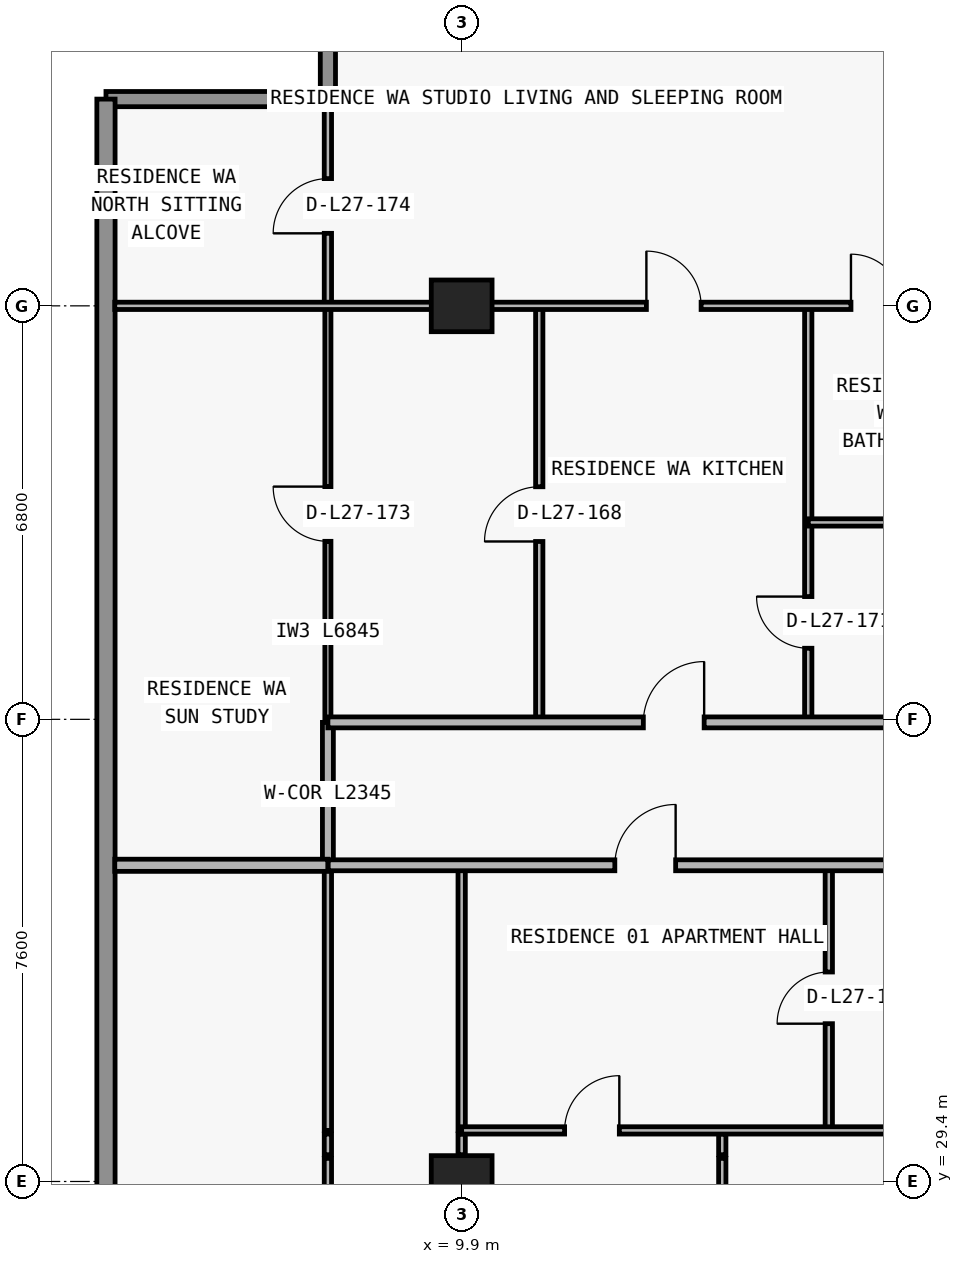
"""IFC4 building model, lengths in metres.
Left out: names, types, materials, properties, quantities, classifications, styles, units other than length and angle.
Written with IfcOpenShell. Run it as: python <this file> out.ifc"""

import sys

from ifc_helpers import new_model, si_unit, direction, frame, frame_2d, origin, origin_2d, place, context, subcontext, project, spatial, rectangle, extrude, element, fill, save


model = new_model("IFC4")
c1 = context("Model", 3, precision=1e-05, world=origin(), true_north=direction((0.0, 1.0)))
c2 = subcontext(c1, "Body", "Model", "MODEL_VIEW")
j1 = project(units=[si_unit("LENGTHUNIT", "METRE"), si_unit("PLANEANGLEUNIT", "RADIAN")], contexts=[c1])
p1 = place(None, origin())
s1 = spatial("IfcSite", under=j1, at=p1, CompositionType="ELEMENT")
p2 = place(p1, origin())
s2 = spatial("IfcBuilding", under=s1, at=p2, CompositionType="ELEMENT")
p3 = place(p2, frame((0.0, 0.0, 102.6)))
s3 = spatial("IfcBuildingStorey", under=s2, at=p3, CompositionType="ELEMENT", Elevation=102.6)
for number, where, z_axis, x_axis in (
    (1, (9.9, 29.4, 0.0), (0.0, 0.0, 1.0), (1.0, 0.0, 0.0)),
    (2, (9.9, 43.8, 0.0), (0.0, 0.0, 1.0), (1.0, 0.0, 0.0)),
):
    element("IfcColumn", number, at=place(p3, frame(where, z_axis=z_axis, x_axis=x_axis)), inside=s3, PredefinedType="COLUMN", context=c2, shape_type="SweptSolid", body=[
        extrude(rectangle(XDim=1.0, YDim=0.85, at=origin_2d()), origin(), (0.0, 0.0, 1.0), 3.05),
    ])
p4 = place(p3, frame((4.05, 47.2, 0.0), z_axis=(0.0, 0.0, 1.0), x_axis=(1.0, 0.0, 0.0)))
e3 = element("IfcWall", 3, at=p4, inside=s3, PredefinedType="ELEMENTEDWALL", context=c2, shape_type="SweptSolid", body=[
    extrude(rectangle(XDim=3.65, YDim=0.25, at=frame_2d((1.825, 0.0))), origin(), (0.0, 0.0, 1.0), 3.05),
])
p5 = place(p3, frame((7.7, 47.2, 0.0), z_axis=(0.0, 0.0, 1.0), x_axis=(0.0, 1.0, 0.0)))
e4 = element("IfcWall", 4, at=p5, inside=s3, PredefinedType="ELEMENTEDWALL", context=c2, shape_type="SweptSolid", body=[
    extrude(rectangle(XDim=3.25, YDim=0.25, at=frame_2d((1.625, 0.0))), origin(), (0.0, 0.0, 1.0), 3.05),
])
p6 = place(p3, frame((4.05, 28.0, 0.0), z_axis=(0.0, 0.0, 1.0), x_axis=(0.0, 1.0, 0.0)))
e5 = element("IfcWall", 5, at=p6, inside=s3, PredefinedType="STANDARD", context=c2, shape_type="SweptSolid", body=[
    extrude(rectangle(XDim=19.2, YDim=0.3, at=frame_2d((9.6, 0.0))), origin(), (0.0, 0.0, 1.0), 3.05),
])
p7 = place(p3, frame((7.7, 25.09, 0.0), z_axis=(0.0, 0.0, 1.0), x_axis=(0.0, 1.0, 0.0)))
e6 = element("IfcWall", 6, at=p7, inside=s3, PredefinedType="PARTITIONING", context=c2, shape_type="SweptSolid", body=[
    extrude(rectangle(XDim=4.69, YDim=0.12, at=frame_2d((2.345, 0.0))), origin(), (0.0, 0.0, 1.0), 3.05),
])
p8 = place(p3, frame((7.7, 29.84, 0.0), z_axis=(0.0, 0.0, 1.0), x_axis=(0.0, 1.0, 0.0)))
e7 = element("IfcWall", 7, at=p8, inside=s3, PredefinedType="PARTITIONING", context=c2, shape_type="SweptSolid", body=[
    extrude(rectangle(XDim=0.34, YDim=0.12, at=frame_2d((0.17, 0.0))), origin(), (0.0, 0.0, 1.0), 3.05),
])
p9 = place(p3, frame((7.7, 30.24, 0.0), z_axis=(0.0, 0.0, 1.0), x_axis=(0.0, 1.0, 0.0)))
e8 = element("IfcWall", 8, at=p9, inside=s3, PredefinedType="PARTITIONING", context=c2, shape_type="SweptSolid", body=[
    extrude(rectangle(XDim=4.36, YDim=0.12, at=frame_2d((2.18, 0.0))), origin(), (0.0, 0.0, 1.0), 3.05),
])
p10 = place(p3, frame((7.7, 34.605, 0.0), z_axis=(0.0, 0.0, 1.0), x_axis=(0.0, 1.0, 0.0)))
e9 = element("IfcWall", 9, at=p10, inside=s3, PredefinedType="PARTITIONING", context=c2, shape_type="SweptSolid", body=[
    extrude(rectangle(XDim=2.345, YDim=0.18, at=frame_2d((1.172, 0.0))), origin(), (0.0, 0.0, 1.0), 3.05),
])
p11 = place(p3, frame((7.7, 36.955, 0.0), z_axis=(0.0, 0.0, 1.0), x_axis=(0.0, 1.0, 0.0)))
e10 = element("IfcWall", 10, at=p11, inside=s3, PredefinedType="MOVABLE", context=c2, shape_type="SweptSolid", body=[
    extrude(rectangle(XDim=6.845, YDim=0.1, at=frame_2d((3.422, 0.0))), origin(), (0.0, 0.0, 1.0), 3.05),
])
p12 = place(p11, frame((2.972, 0.0, 0.0)))
e11 = element("IfcOpeningElement", 11, at=p12, cuts=e10, PredefinedType="OPENING", context=c2, shape_type="SweptSolid", body=[
    extrude(rectangle(XDim=0.9, YDim=2.15, at=frame_2d((0.45, 1.075))), frame((0.0, 0.06, 0.0), z_axis=(0.0, -1.0, 0.0), x_axis=(1.0, 0.0, 0.0)), (0.0, 0.0, 1.0), 0.12),
])
p13 = place(p3, frame((7.7, 43.805, 0.0), z_axis=(0.0, 0.0, 1.0), x_axis=(0.0, 1.0, 0.0)))
e12 = element("IfcWall", 12, at=p13, inside=s3, PredefinedType="PARTITIONING", context=c2, shape_type="SweptSolid", body=[
    extrude(rectangle(XDim=3.275, YDim=0.12, at=frame_2d((1.638, 0.0))), origin(), (0.0, 0.0, 1.0), 3.05),
])
p14 = place(p13, frame((1.188, 0.0, 0.0)))
e13 = element("IfcOpeningElement", 13, at=p14, cuts=e12, PredefinedType="OPENING", context=c2, shape_type="SweptSolid", body=[
    extrude(rectangle(XDim=0.9, YDim=2.15, at=frame_2d((0.45, 1.075))), frame((0.0, 0.07, 0.0), z_axis=(0.0, -1.0, 0.0), x_axis=(1.0, 0.0, 0.0)), (0.0, 0.0, 1.0), 0.14),
])
p15 = place(p3, frame((9.9, 25.09, 0.0), z_axis=(0.0, 0.0, 1.0), x_axis=(0.0, 1.0, 0.0)))
e14 = element("IfcWall", 14, at=p15, inside=s3, PredefinedType="PARTITIONING", context=c2, shape_type="SweptSolid", body=[
    extrude(rectangle(XDim=4.69, YDim=0.12, at=frame_2d((2.345, 0.0))), origin(), (0.0, 0.0, 1.0), 2.174),
])
p16 = place(p15, frame((1.895, 0.0, 0.0)))
e15 = element("IfcOpeningElement", 15, at=p16, cuts=e14, PredefinedType="OPENING", context=c2, shape_type="SweptSolid", body=[
    extrude(rectangle(XDim=0.9, YDim=2.124, at=frame_2d((0.45, 1.062))), frame((0.0, 0.07, 0.0), z_axis=(0.0, -1.0, 0.0), x_axis=(1.0, 0.0, 0.0)), (0.0, 0.0, 1.0), 0.14),
])
p17 = place(p3, frame((9.9, 29.84, 0.0), z_axis=(0.0, 0.0, 1.0), x_axis=(0.0, 1.0, 0.0)))
e16 = element("IfcWall", 16, at=p17, inside=s3, PredefinedType="PARTITIONING", context=c2, shape_type="SweptSolid", body=[
    extrude(rectangle(XDim=0.34, YDim=0.12, at=frame_2d((0.17, 0.0))), origin(), (0.0, 0.0, 1.0), 2.174),
])
p18 = place(p3, frame((9.9, 30.24, 0.0), z_axis=(0.0, 0.0, 1.0), x_axis=(0.0, 1.0, 0.0)))
e17 = element("IfcWall", 17, at=p18, inside=s3, PredefinedType="PARTITIONING", context=c2, shape_type="SweptSolid", body=[
    extrude(rectangle(XDim=4.36, YDim=0.12, at=frame_2d((2.18, 0.0))), origin(), (0.0, 0.0, 1.0), 2.174),
])
p19 = place(p3, frame((11.176, 36.95, 0.0), z_axis=(0.0, 0.0, 1.0), x_axis=(0.0, 1.0, 0.0)))
e18 = element("IfcWall", 18, at=p19, inside=s3, PredefinedType="PARTITIONING", context=c2, shape_type="SweptSolid", body=[
    extrude(rectangle(XDim=6.85, YDim=0.12, at=frame_2d((3.425, 0.0))), origin(), (0.0, 0.0, 1.0), 3.05),
])
p20 = place(p19, frame((2.975, 0.0, 0.0)))
e19 = element("IfcOpeningElement", 19, at=p20, cuts=e18, PredefinedType="OPENING", context=c2, shape_type="SweptSolid", body=[
    extrude(rectangle(XDim=0.9, YDim=2.15, at=frame_2d((0.45, 1.075))), frame((0.0, 0.07, 0.0), z_axis=(0.0, -1.0, 0.0), x_axis=(1.0, 0.0, 0.0)), (0.0, 0.0, 1.0), 0.14),
])
p21 = place(p3, frame((14.186, 25.09, 0.0), z_axis=(0.0, 0.0, 1.0), x_axis=(0.0, 1.0, 0.0)))
e20 = element("IfcWall", 20, at=p21, inside=s3, PredefinedType="PARTITIONING", context=c2, shape_type="SweptSolid", body=[
    extrude(rectangle(XDim=4.69, YDim=0.12, at=frame_2d((2.345, 0.0))), origin(), (0.0, 0.0, 1.0), 3.05),
])
p22 = place(p21, frame((1.895, 0.0, 0.0)))
e21 = element("IfcOpeningElement", 21, at=p22, cuts=e20, PredefinedType="OPENING", context=c2, shape_type="SweptSolid", body=[
    extrude(rectangle(XDim=0.9, YDim=2.15, at=frame_2d((0.45, 1.075))), frame((0.0, 0.07, 0.0), z_axis=(0.0, -1.0, 0.0), x_axis=(1.0, 0.0, 0.0)), (0.0, 0.0, 1.0), 0.14),
])
p23 = place(p3, frame((14.186, 29.84, 0.0), z_axis=(0.0, 0.0, 1.0), x_axis=(0.0, 1.0, 0.0)))
e22 = element("IfcWall", 22, at=p23, inside=s3, PredefinedType="PARTITIONING", context=c2, shape_type="SweptSolid", body=[
    extrude(rectangle(XDim=0.34, YDim=0.12, at=frame_2d((0.17, 0.0))), origin(), (0.0, 0.0, 1.0), 3.05),
])
p24 = place(p3, frame((15.6, 36.95, 0.0), z_axis=(0.0, 0.0, 1.0), x_axis=(0.0, 1.0, 0.0)))
e23 = element("IfcWall", 23, at=p24, inside=s3, PredefinedType="PARTITIONING", context=c2, shape_type="SweptSolid", body=[
    extrude(rectangle(XDim=6.85, YDim=0.12, at=frame_2d((3.425, 0.0))), origin(), (0.0, 0.0, 1.0), 3.05),
])
p25 = place(p24, frame((1.219, 0.0, 0.0)))
e24 = element("IfcOpeningElement", 24, at=p25, cuts=e23, PredefinedType="OPENING", context=c2, shape_type="SweptSolid", body=[
    extrude(rectangle(XDim=0.85, YDim=2.1, at=frame_2d((0.425, 1.05))), frame((0.0, 0.07, 0.0), z_axis=(0.0, -1.0, 0.0), x_axis=(1.0, 0.0, 0.0)), (0.0, 0.0, 1.0), 0.14),
])
p26 = place(p3, frame((15.938, 30.24, 0.0), z_axis=(0.0, 0.0, 1.0), x_axis=(0.0, 1.0, 0.0)))
e25 = element("IfcWall", 25, at=p26, inside=s3, PredefinedType="PARTITIONING", context=c2, shape_type="SweptSolid", body=[
    extrude(rectangle(XDim=4.36, YDim=0.12, at=frame_2d((2.18, 0.0))), origin(), (0.0, 0.0, 1.0), 3.05),
])
p27 = place(p26, frame((1.755, 0.0, 0.0)))
e26 = element("IfcOpeningElement", 26, at=p27, cuts=e25, PredefinedType="OPENING", context=c2, shape_type="SweptSolid", body=[
    extrude(rectangle(XDim=0.85, YDim=2.1, at=frame_2d((0.425, 1.05))), frame((0.0, 0.07, 0.0), z_axis=(0.0, -1.0, 0.0), x_axis=(1.0, 0.0, 0.0)), (0.0, 0.0, 1.0), 0.14),
])
p28 = place(p3, frame((9.9, 30.24, 0.0), z_axis=(0.0, 0.0, 1.0), x_axis=(1.0, 0.0, 0.0)))
e27 = element("IfcWall", 27, at=p28, inside=s3, PredefinedType="PARTITIONING", context=c2, shape_type="SweptSolid", body=[
    extrude(rectangle(XDim=8.35, YDim=0.12, at=frame_2d((4.175, 0.0))), origin(), (0.0, 0.0, 1.0), 3.05),
])
p29 = place(p28, frame((1.693, 0.0, 0.0)))
e28 = element("IfcOpeningElement", 28, at=p29, cuts=e27, PredefinedType="OPENING", context=c2, shape_type="SweptSolid", body=[
    extrude(rectangle(XDim=0.9, YDim=2.15, at=frame_2d((0.45, 1.075))), frame((0.0, 0.07, 0.0), z_axis=(0.0, -1.0, 0.0), x_axis=(1.0, 0.0, 0.0)), (0.0, 0.0, 1.0), 0.14),
])
p30 = place(p3, frame((4.195, 34.6, 0.0), z_axis=(0.0, 0.0, 1.0), x_axis=(1.0, 0.0, 0.0)))
e29 = element("IfcWall", 29, at=p30, inside=s3, PredefinedType="PARTITIONING", context=c2, shape_type="SweptSolid", body=[
    extrude(rectangle(XDim=3.505, YDim=0.2, at=frame_2d((1.752, 0.0))), origin(), (0.0, 0.0, 1.0), 3.05),
])
p31 = place(p3, frame((7.705, 34.6, 0.0), z_axis=(0.0, 0.0, 1.0), x_axis=(1.0, 0.0, 0.0)))
e30 = element("IfcWall", 30, at=p31, inside=s3, PredefinedType="PARTITIONING", context=c2, shape_type="SweptSolid", body=[
    extrude(rectangle(XDim=10.545, YDim=0.18, at=frame_2d((5.272, 0.0))), origin(), (0.0, 0.0, 1.0), 3.05),
])
p32 = place(p31, frame((4.714, 0.0, 0.0)))
e31 = element("IfcOpeningElement", 31, at=p32, cuts=e30, PredefinedType="OPENING", context=c2, shape_type="SweptSolid", body=[
    extrude(rectangle(XDim=1.0, YDim=2.2, at=frame_2d((0.5, 1.1))), frame((0.0, 0.1, 0.0), z_axis=(0.0, -1.0, 0.0), x_axis=(1.0, 0.0, 0.0)), (0.0, 0.0, 1.0), 0.2),
])
p33 = place(p3, frame((7.7, 36.95, 0.0), z_axis=(0.0, 0.0, 1.0), x_axis=(1.0, 0.0, 0.0)))
e32 = element("IfcWall", 32, at=p33, inside=s3, PredefinedType="PARTITIONING", context=c2, shape_type="SweptSolid", body=[
    extrude(rectangle(XDim=10.145, YDim=0.18, at=frame_2d((5.073, 0.0))), origin(), (0.0, 0.0, 1.0), 3.05),
])
p34 = place(p33, frame((5.188, 0.0, 0.0)))
e33 = element("IfcOpeningElement", 33, at=p34, cuts=e32, PredefinedType="OPENING", context=c2, shape_type="SweptSolid", body=[
    extrude(rectangle(XDim=1.0, YDim=2.2, at=frame_2d((0.5, 1.1))), frame((0.0, 0.1, 0.0), z_axis=(0.0, -1.0, 0.0), x_axis=(1.0, 0.0, 0.0)), (0.0, 0.0, 1.0), 0.2),
])
p35 = place(p3, frame((15.6, 40.238, 0.0), z_axis=(0.0, 0.0, 1.0), x_axis=(1.0, 0.0, 0.0)))
e34 = element("IfcWall", 34, at=p35, inside=s3, PredefinedType="PARTITIONING", context=c2, shape_type="SweptSolid", body=[
    extrude(rectangle(XDim=2.255, YDim=0.12, at=frame_2d((1.127, 0.0))), origin(), (0.0, 0.0, 1.0), 3.05),
])
p36 = place(p3, frame((4.195, 43.8, 0.0), z_axis=(0.0, 0.0, 1.0), x_axis=(1.0, 0.0, 0.0)))
e35 = element("IfcWall", 35, at=p36, inside=s3, PredefinedType="PARTITIONING", context=c2, shape_type="SweptSolid", body=[
    extrude(rectangle(XDim=13.66, YDim=0.12, at=frame_2d((6.83, 0.0))), origin(), (0.0, 0.0, 1.0), 2.339),
])
p37 = place(p36, frame((8.743, 0.0, 0.0)))
e36 = element("IfcOpeningElement", 36, at=p37, cuts=e35, PredefinedType="OPENING", context=c2, shape_type="SweptSolid", body=[
    extrude(rectangle(XDim=0.9, YDim=2.15, at=frame_2d((0.45, 1.075))), frame((0.0, 0.07, 0.0), z_axis=(0.0, -1.0, 0.0), x_axis=(1.0, 0.0, 0.0)), (0.0, 0.0, 1.0), 0.14),
])
p38 = place(p36, frame((12.107, 0.0, 0.0)))
e37 = element("IfcOpeningElement", 37, at=p38, cuts=e35, PredefinedType="OPENING", context=c2, shape_type="SweptSolid", body=[
    extrude(rectangle(XDim=0.85, YDim=2.1, at=frame_2d((0.425, 1.05))), frame((0.0, 0.07, 0.0), z_axis=(0.0, -1.0, 0.0), x_axis=(1.0, 0.0, 0.0)), (0.0, 0.0, 1.0), 0.14),
])
p39 = place(p32, origin())
e38 = element("IfcDoor", 38, at=p39, inside=s3, OperationType="SINGLE_SWING_RIGHT", PredefinedType="DOOR", context=c2, shape_type="SweptSolid", body=[
    extrude(rectangle(XDim=1.0, YDim=2.2, at=frame_2d((0.5, 1.1))), frame((0.0, 0.025, 0.0), z_axis=(0.0, -1.0, 0.0), x_axis=(1.0, 0.0, 0.0)), (0.0, 0.0, 1.0), 0.05),
])
fill(e31, e38)
p40 = place(p27, origin())
e39 = element("IfcDoor", 39, at=p40, inside=s3, OperationType="SINGLE_SWING_LEFT", PredefinedType="DOOR", context=c2, shape_type="SweptSolid", body=[
    extrude(rectangle(XDim=0.85, YDim=2.1, at=frame_2d((0.425, 1.05))), frame((0.0, 0.025, 0.0), z_axis=(0.0, -1.0, 0.0), x_axis=(1.0, 0.0, 0.0)), (0.0, 0.0, 1.0), 0.05),
])
fill(e26, e39)
p41 = place(p29, origin())
e40 = element("IfcDoor", 40, at=p41, inside=s3, OperationType="SINGLE_SWING_RIGHT", PredefinedType="DOOR", context=c2, shape_type="SweptSolid", body=[
    extrude(rectangle(XDim=0.9, YDim=2.15, at=frame_2d((0.45, 1.075))), frame((0.0, 0.025, 0.0), z_axis=(0.0, -1.0, 0.0), x_axis=(1.0, 0.0, 0.0)), (0.0, 0.0, 1.0), 0.05),
])
fill(e28, e40)
p42 = place(p20, origin())
e41 = element("IfcDoor", 41, at=p42, inside=s3, OperationType="SINGLE_SWING_LEFT", PredefinedType="DOOR", context=c2, shape_type="SweptSolid", body=[
    extrude(rectangle(XDim=0.9, YDim=2.15, at=frame_2d((0.45, 1.075))), frame((0.0, 0.025, 0.0), z_axis=(0.0, -1.0, 0.0), x_axis=(1.0, 0.0, 0.0)), (0.0, 0.0, 1.0), 0.05),
])
fill(e19, e41)
p43 = place(p34, origin())
e42 = element("IfcDoor", 42, at=p43, inside=s3, OperationType="SINGLE_SWING_RIGHT", PredefinedType="DOOR", context=c2, shape_type="SweptSolid", body=[
    extrude(rectangle(XDim=1.0, YDim=2.2, at=frame_2d((0.5, 1.1))), frame((0.0, 0.025, 0.0), z_axis=(0.0, -1.0, 0.0), x_axis=(1.0, 0.0, 0.0)), (0.0, 0.0, 1.0), 0.05),
])
fill(e33, e42)
p44 = place(p37, origin())
e43 = element("IfcDoor", 43, at=p44, inside=s3, OperationType="SINGLE_SWING_LEFT", PredefinedType="DOOR", context=c2, shape_type="SweptSolid", body=[
    extrude(rectangle(XDim=0.9, YDim=2.15, at=frame_2d((0.45, 1.075))), frame((0.0, 0.025, 0.0), z_axis=(0.0, -1.0, 0.0), x_axis=(1.0, 0.0, 0.0)), (0.0, 0.0, 1.0), 0.05),
])
fill(e36, e43)
p45 = place(p25, origin())
e44 = element("IfcDoor", 44, at=p45, inside=s3, OperationType="SINGLE_SWING_RIGHT", PredefinedType="DOOR", context=c2, shape_type="SweptSolid", body=[
    extrude(rectangle(XDim=0.85, YDim=2.1, at=frame_2d((0.425, 1.05))), frame((0.0, 0.025, 0.0), z_axis=(0.0, -1.0, 0.0), x_axis=(1.0, 0.0, 0.0)), (0.0, 0.0, 1.0), 0.05),
])
fill(e24, e44)
p46 = place(p38, origin())
e45 = element("IfcDoor", 45, at=p46, inside=s3, OperationType="SINGLE_SWING_LEFT", PredefinedType="DOOR", context=c2, shape_type="SweptSolid", body=[
    extrude(rectangle(XDim=0.85, YDim=2.1, at=frame_2d((0.425, 1.05))), frame((0.0, 0.025, 0.0), z_axis=(0.0, -1.0, 0.0), x_axis=(1.0, 0.0, 0.0)), (0.0, 0.0, 1.0), 0.05),
])
fill(e37, e45)
p47 = place(p12, origin())
e46 = element("IfcDoor", 46, at=p47, inside=s3, OperationType="SINGLE_SWING_RIGHT", PredefinedType="DOOR", context=c2, shape_type="SweptSolid", body=[
    extrude(rectangle(XDim=0.9, YDim=2.15, at=frame_2d((0.45, 1.075))), frame((0.0, 0.025, 0.0), z_axis=(0.0, -1.0, 0.0), x_axis=(1.0, 0.0, 0.0)), (0.0, 0.0, 1.0), 0.05),
])
fill(e11, e46)
p48 = place(p14, origin())
e47 = element("IfcDoor", 47, at=p48, inside=s3, OperationType="SINGLE_SWING_LEFT", PredefinedType="DOOR", context=c2, shape_type="SweptSolid", body=[
    extrude(rectangle(XDim=0.9, YDim=2.15, at=frame_2d((0.45, 1.075))), frame((0.0, 0.025, 0.0), z_axis=(0.0, -1.0, 0.0), x_axis=(1.0, 0.0, 0.0)), (0.0, 0.0, 1.0), 0.05),
])
fill(e13, e47)
save(model, sys.argv[1])
